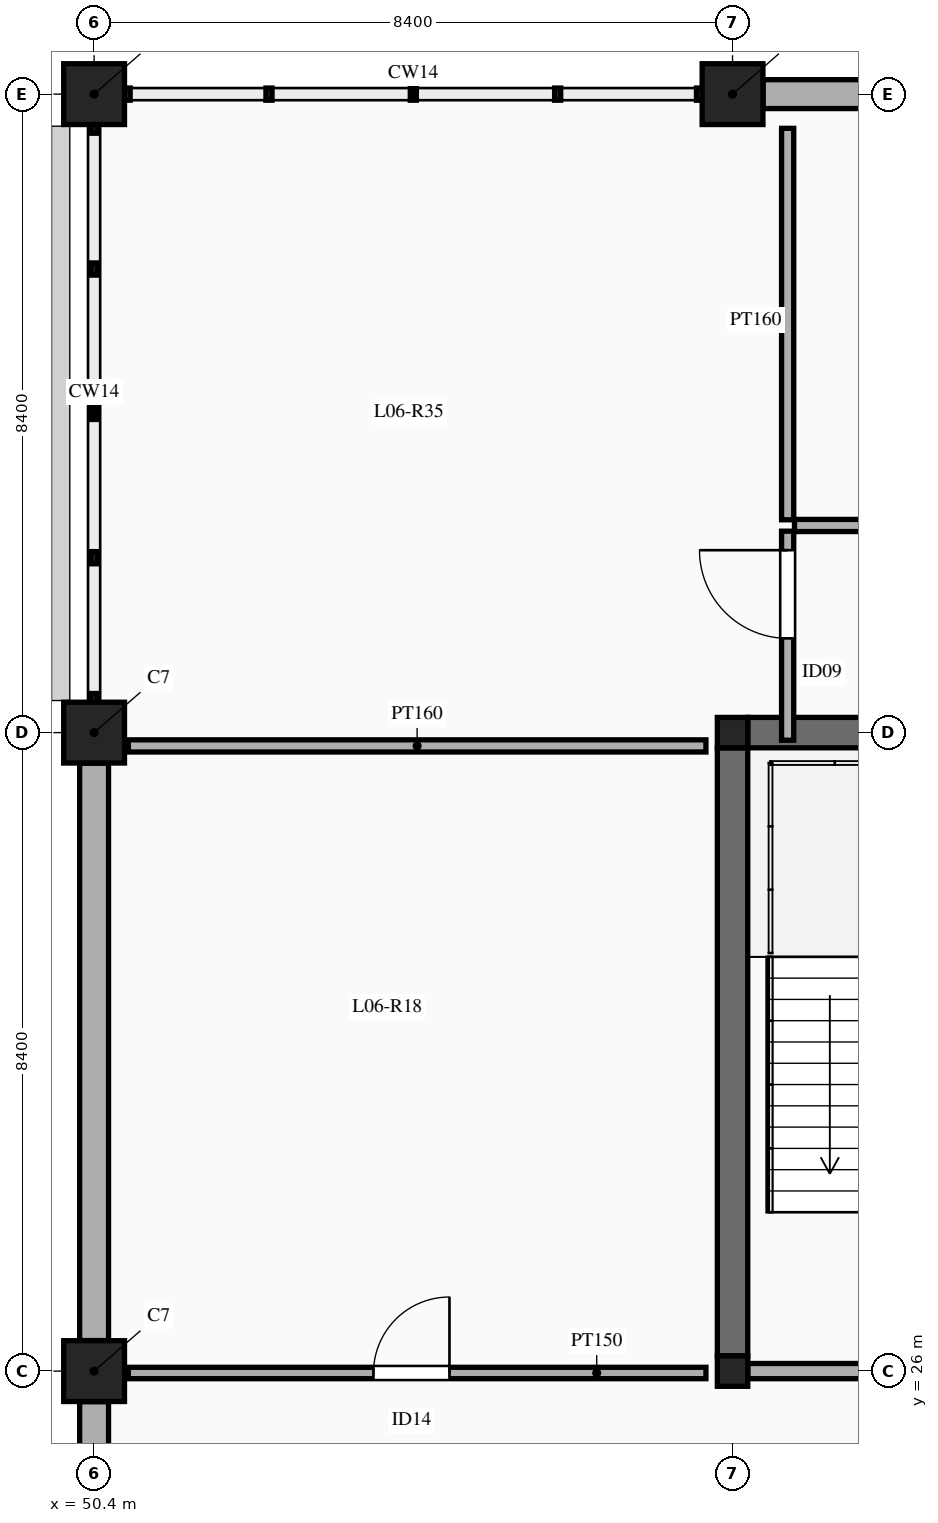
"""IFC4 building model, lengths in metres.
Left out: names, types, materials, properties, quantities, classifications, styles, units other than length and angle.
Written with IfcOpenShell. Run it as: python <this file> out.ifc"""

import sys

from ifc_helpers import new_model, si_unit, direction, frame, frame_2d, origin, origin_2d, place, context, subcontext, project, spatial, rectangle, extrude, element, fill, save


model = new_model("IFC4")
c1 = context("Model", 3, precision=1e-05, world=origin(), true_north=direction((0.0, 1.0)))
c2 = subcontext(c1, "Body", "Model", "MODEL_VIEW")
j1 = project(units=[si_unit("LENGTHUNIT", "METRE"), si_unit("PLANEANGLEUNIT", "RADIAN")], contexts=[c1])
p1 = place(None, origin())
s1 = spatial("IfcSite", under=j1, at=p1, CompositionType="ELEMENT")
p2 = place(p1, origin())
s2 = spatial("IfcBuilding", under=s1, at=p2, CompositionType="ELEMENT")
p3 = place(p2, frame((0.0, 0.0, 28.5)))
s3 = spatial("IfcBuildingStorey", under=s2, at=p3, CompositionType="ELEMENT", Elevation=28.5)
for number, where, z_axis, x_axis in (
    (1, (50.4, 26.0, 0.0), (0.0, 0.0, 1.0), (1.0, 0.0, 0.0)),
    (2, (50.4, 34.4, 0.0), (0.0, 0.0, 1.0), (1.0, 0.0, 0.0)),
    (3, (50.4, 42.8, 0.0), (0.0, 0.0, 1.0), (1.0, 0.0, 0.0)),
):
    element("IfcColumn", number, at=place(p3, frame(where, z_axis=z_axis, x_axis=x_axis)), inside=s3, PredefinedType="COLUMN", context=c2, shape_type="SweptSolid", body=[
        extrude(rectangle(XDim=0.8, YDim=0.8, at=origin_2d()), origin(), (0.0, 0.0, 1.0), 4.5),
    ])
for number, where, z_axis, x_axis in (
    (4, (58.8, 26.0, 0.0), (0.0, 0.0, 1.0), (1.0, 0.0, 0.0)),
    (5, (58.8, 34.4, 0.0), (0.0, 0.0, 1.0), (1.0, 0.0, 0.0)),
):
    element("IfcColumn", number, at=place(p3, frame(where, z_axis=z_axis, x_axis=x_axis)), inside=s3, PredefinedType="COLUMN", context=c2, shape_type="SweptSolid", body=[
        extrude(rectangle(XDim=0.4, YDim=0.4, at=origin_2d()), origin(), (0.0, 0.0, 1.0), 4.5),
    ])
p4 = place(p3, frame((58.8, 42.8, 0.0), z_axis=(0.0, 0.0, 1.0), x_axis=(1.0, 0.0, 0.0)))
e6 = element("IfcColumn", 6, at=p4, inside=s3, PredefinedType="COLUMN", context=c2, shape_type="SweptSolid", body=[
    extrude(rectangle(XDim=0.8, YDim=0.8, at=origin_2d()), origin(), (0.0, 0.0, 1.0), 4.5),
])
for number, where, z_axis, x_axis in (
    (7, (58.8, 26.2, 0.0), (0.0, 0.0, 1.0), (0.0, 1.0, 0.0)),
    (8, (59.0, 34.4, 0.0), (0.0, 0.0, 1.0), (1.0, 0.0, 0.0)),
):
    element("IfcWall", number, at=place(p3, frame(where, z_axis=z_axis, x_axis=x_axis)), inside=s3, PredefinedType="SHEAR", context=c2, shape_type="SweptSolid", body=[
        extrude(rectangle(XDim=8.0, YDim=0.4, at=frame_2d((4.0, 0.0))), origin(), (0.0, 0.0, 1.0), 4.5),
    ])
p5 = place(p3, frame((59.202, 42.8, 0.0), z_axis=(0.0, 0.0, 1.0), x_axis=(1.0, 0.0, 0.0)))
e9 = element("IfcWall", 9, at=p5, inside=s3, PredefinedType="SOLIDWALL", context=c2, shape_type="SweptSolid", body=[
    extrude(rectangle(XDim=7.596, YDim=0.38, at=frame_2d((3.798, 0.0))), origin(), (0.0, 0.0, 1.0), 3.55),
])
for number, where, z_axis, x_axis in (
    (10, (50.4, 18.002, 0.0), (0.0, 0.0, 1.0), (0.0, 1.0, 0.0)),
    (11, (50.4, 26.402, 0.0), (0.0, 0.0, 1.0), (0.0, 1.0, 0.0)),
):
    element("IfcWall", number, at=place(p3, frame(where, z_axis=z_axis, x_axis=x_axis)), inside=s3, PredefinedType="SOLIDWALL", context=c2, shape_type="SweptSolid", body=[
        extrude(rectangle(XDim=7.596, YDim=0.38, at=frame_2d((3.798, 0.0))), origin(), (0.0, 0.0, 1.0), 3.55),
    ])
p6 = place(p3, frame((59.0, 26.0, 0.0), z_axis=(0.0, 0.0, 1.0), x_axis=(1.0, 0.0, 0.0)))
e12 = element("IfcWall", 12, at=p6, inside=s3, PredefinedType="SOLIDWALL", context=c2, shape_type="SweptSolid", body=[
    extrude(rectangle(XDim=8.0, YDim=0.2, at=frame_2d((4.0, 0.0))), origin(), (0.0, 0.0, 1.0), 3.78),
])
p7 = place(p6, frame((1.55, 0.0, 0.0)))
e13 = element("IfcOpeningElement", 13, at=p7, cuts=e12, PredefinedType="OPENING", context=c2, shape_type="SweptSolid", body=[
    extrude(rectangle(XDim=1.15, YDim=2.15, at=frame_2d((0.575, 1.075))), frame((0.0, 0.11, 0.0), z_axis=(0.0, -1.0, 0.0), x_axis=(1.0, 0.0, 0.0)), (0.0, 0.0, 1.0), 0.22),
])
p8 = place(p6, frame((5.35, 0.0, 0.0)))
e14 = element("IfcOpeningElement", 14, at=p8, cuts=e12, PredefinedType="OPENING", context=c2, shape_type="SweptSolid", body=[
    extrude(rectangle(XDim=1.22, YDim=2.15, at=frame_2d((0.61, 1.075))), frame((0.0, 0.11, 0.0), z_axis=(0.0, -1.0, 0.0), x_axis=(1.0, 0.0, 0.0)), (0.0, 0.0, 1.0), 0.22),
])
p9 = place(p3, frame((50.85, 25.975, 0.0), z_axis=(0.0, 0.0, 1.0), x_axis=(1.0, 0.0, 0.0)))
e15 = element("IfcWall", 15, at=p9, inside=s3, PredefinedType="PARTITIONING", context=c2, shape_type="SweptSolid", body=[
    extrude(rectangle(XDim=7.6, YDim=0.15, at=frame_2d((3.8, 0.0))), origin(), (0.0, 0.0, 1.0), 3.45),
])
p10 = place(p9, frame((3.226, 0.0, 0.0)))
e16 = element("IfcOpeningElement", 16, at=p10, cuts=e15, PredefinedType="OPENING", context=c2, shape_type="SweptSolid", body=[
    extrude(rectangle(XDim=1.0, YDim=2.15, at=frame_2d((0.5, 1.075))), frame((0.0, 0.085, 0.0), z_axis=(0.0, -1.0, 0.0), x_axis=(1.0, 0.0, 0.0)), (0.0, 0.0, 1.0), 0.17),
])
p11 = place(p3, frame((50.85, 34.225, 0.0), z_axis=(0.0, 0.0, 1.0), x_axis=(1.0, 0.0, 0.0)))
e17 = element("IfcWall", 17, at=p11, inside=s3, PredefinedType="PARTITIONING", context=c2, shape_type="SweptSolid", body=[
    extrude(rectangle(XDim=7.6, YDim=0.16, at=frame_2d((3.8, 0.0))), origin(), (0.0, 0.0, 1.0), 3.45),
])
p12 = place(p3, frame((59.525, 34.3, 0.0), z_axis=(0.0, 0.0, 1.0), x_axis=(0.0, 1.0, 0.0)))
e18 = element("IfcWall", 18, at=p12, inside=s3, PredefinedType="PARTITIONING", context=c2, shape_type="SweptSolid", body=[
    extrude(rectangle(XDim=2.75, YDim=0.16, at=frame_2d((1.375, 0.0))), origin(), (0.0, 0.0, 1.0), 3.45),
])
p13 = place(p12, frame((1.34, 0.0, 0.0)))
e19 = element("IfcOpeningElement", 19, at=p13, cuts=e18, PredefinedType="OPENING", context=c2, shape_type="SweptSolid", body=[
    extrude(rectangle(XDim=1.16, YDim=2.2, at=frame_2d((0.58, 1.1))), frame((0.0, 0.09, 0.0), z_axis=(0.0, -1.0, 0.0), x_axis=(1.0, 0.0, 0.0)), (0.0, 0.0, 1.0), 0.18),
])
p14 = place(p3, frame((59.615, 37.125, 0.0), z_axis=(0.0, 0.0, 1.0), x_axis=(1.0, 0.0, 0.0)))
e20 = element("IfcWall", 20, at=p14, inside=s3, PredefinedType="PARTITIONING", context=c2, shape_type="SweptSolid", body=[
    extrude(rectangle(XDim=13.385, YDim=0.16, at=frame_2d((6.692, 0.0))), origin(), (0.0, 0.0, 1.0), 3.45),
])
p15 = place(p14, frame((4.609, 0.0, 0.0)))
e21 = element("IfcOpeningElement", 21, at=p15, cuts=e20, PredefinedType="OPENING", context=c2, shape_type="SweptSolid", body=[
    extrude(rectangle(XDim=1.16, YDim=2.2, at=frame_2d((0.58, 1.1))), frame((0.0, 0.09, 0.0), z_axis=(0.0, -1.0, 0.0), x_axis=(1.0, 0.0, 0.0)), (0.0, 0.0, 1.0), 0.18),
])
p16 = place(p3, frame((59.525, 37.2, 0.0), z_axis=(0.0, 0.0, 1.0), x_axis=(0.0, 1.0, 0.0)))
e22 = element("IfcWall", 22, at=p16, inside=s3, PredefinedType="PARTITIONING", context=c2, shape_type="SweptSolid", body=[
    extrude(rectangle(XDim=5.15, YDim=0.16, at=frame_2d((2.575, 0.0))), origin(), (0.0, 0.0, 1.0), 3.45),
])
p17 = place(p10, origin())
e23 = element("IfcDoor", 23, at=p17, inside=s3, OperationType="SINGLE_SWING_RIGHT", PredefinedType="DOOR", context=c2, shape_type="SweptSolid", body=[
    extrude(rectangle(XDim=1.0, YDim=2.15, at=frame_2d((0.5, 1.075))), frame((0.0, 0.025, 0.0), z_axis=(0.0, -1.0, 0.0), x_axis=(1.0, 0.0, 0.0)), (0.0, 0.0, 1.0), 0.05),
])
fill(e16, e23)
p18 = place(p13, origin())
e24 = element("IfcDoor", 24, at=p18, inside=s3, OperationType="SINGLE_SWING_RIGHT", PredefinedType="DOOR", context=c2, shape_type="SweptSolid", body=[
    extrude(rectangle(XDim=1.16, YDim=2.2, at=frame_2d((0.58, 1.1))), frame((0.0, 0.025, 0.0), z_axis=(0.0, -1.0, 0.0), x_axis=(1.0, 0.0, 0.0)), (0.0, 0.0, 1.0), 0.05),
])
fill(e19, e24)
save(model, sys.argv[1])
